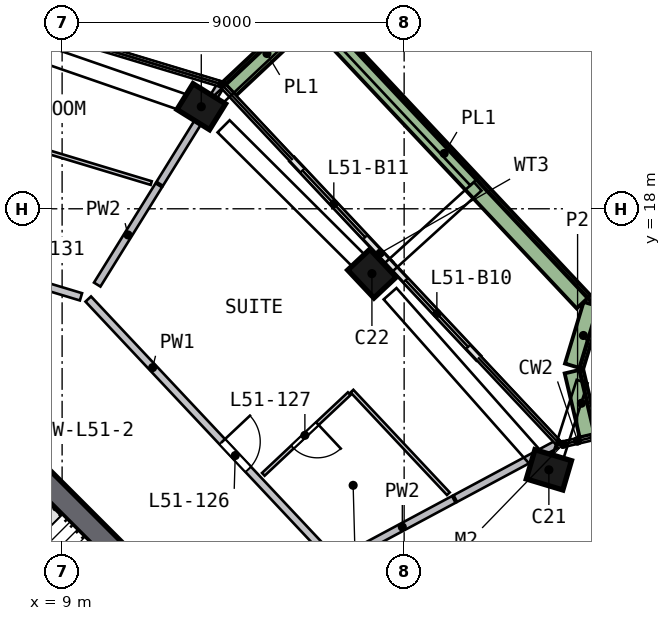
"""IFC4 building model, lengths in metres.
Left out: names, types, materials, properties, quantities, classifications, styles, units other than length and angle.
Written with IfcOpenShell. Run it as: python <this file> out.ifc"""

import sys

from ifc_helpers import new_model, si_unit, direction, frame, frame_2d, origin, origin_2d, place, context, subcontext, project, spatial, rectangle, extrude, element, fill, save


model = new_model("IFC4")
c1 = context("Model", 3, precision=1e-05, world=origin(), true_north=direction((0.0, 1.0)))
c2 = subcontext(c1, "Body", "Model", "MODEL_VIEW")
j1 = project(units=[si_unit("LENGTHUNIT", "METRE"), si_unit("PLANEANGLEUNIT", "RADIAN")], contexts=[c1])
p1 = place(None, origin())
s1 = spatial("IfcSite", under=j1, at=p1, CompositionType="ELEMENT")
p2 = place(p1, origin())
s2 = spatial("IfcBuilding", under=s1, at=p2, CompositionType="ELEMENT")
p3 = place(p2, frame((0.0, 0.0, 209.0)))
s3 = spatial("IfcBuildingStorey", under=s2, at=p3, CompositionType="ELEMENT", Elevation=209.0)
p4 = place(p3, frame((21.873, 11.005, 0.0), z_axis=(-0.053209958, 0.103531375, 0.99320187), x_axis=(0.956204867, -0.281393471, 0.080560333)))
e1 = element("IfcColumn", 1, at=p4, inside=s3, PredefinedType="COLUMN", context=c2, shape_type="SweptSolid", body=[
    extrude(rectangle(XDim=1.0, YDim=0.8, at=origin_2d()), origin(), (0.0, 0.0, 1.0), 3.212),
])
p5 = place(p3, frame((17.246, 16.195, 0.0), z_axis=(-0.077721499, 0.081371824, 0.993648829), x_axis=(-0.68019237, 0.724346074, -0.112521575)))
e2 = element("IfcColumn", 2, at=p5, inside=s3, PredefinedType="COLUMN", context=c2, shape_type="SweptSolid", body=[
    extrude(rectangle(XDim=1.0, YDim=0.8, at=origin_2d()), origin(), (0.0, 0.0, 1.0), 3.21),
])
p6 = place(p3, frame((12.781, 20.614, 0.0), z_axis=(-0.0985271, 0.059906909, 0.993329539), x_axis=(0.844341944, -0.523250609, 0.115306034)))
e3 = element("IfcColumn", 3, at=p6, inside=s3, PredefinedType="COLUMN", context=c2, shape_type="SweptSolid", body=[
    extrude(rectangle(XDim=1.0, YDim=0.8, at=origin_2d()), origin(), (0.0, 0.0, 1.0), 3.211),
])
p7 = place(p3, frame((13.788, 5.587, 0.0), z_axis=(0.0, 0.0, 1.0), x_axis=(-0.707106781, 0.707106781, 0.0)))
e4 = element("IfcWall", 4, at=p7, inside=s3, PredefinedType="SHEAR", context=c2, shape_type="SweptSolid", body=[
    extrude(rectangle(XDim=11.598, YDim=0.6, at=frame_2d((5.799, 0.0))), origin(), (0.0, 0.0, 1.0), 3.5),
])
p8 = place(p7, frame((2.099, 0.0, 0.0)))
e5 = element("IfcOpeningElement", 5, at=p8, cuts=e4, PredefinedType="OPENING", context=c2, shape_type="SweptSolid", body=[
    extrude(rectangle(XDim=1.2, YDim=2.1, at=frame_2d((0.6, 1.05))), frame((0.0, 0.31, 0.0), z_axis=(0.0, -1.0, 0.0), x_axis=(1.0, 0.0, 0.0)), (0.0, 0.0, 1.0), 0.62),
])
p9 = place(p3, frame((19.956, 14.076, 0.0), z_axis=(0.0, 0.0, 1.0), x_axis=(-0.684533271, 0.728981619, 0.0)))
e6 = element("IfcWall", 6, at=p9, inside=s3, PredefinedType="SOLIDWALL", context=c2, shape_type="SweptSolid", body=[
    extrude(rectangle(XDim=3.4, YDim=0.15, at=frame_2d((1.7, 0.0))), origin(), (0.0, 0.0, 1.0), 2.475),
])
p10 = place(p9, frame((0.4, 0.0, 0.0)))
e7 = element("IfcOpeningElement", 7, at=p10, cuts=e6, PredefinedType="OPENING", context=c2, shape_type="SweptSolid", body=[
    extrude(rectangle(XDim=2.4, YDim=2.4, at=frame_2d((1.2, 1.2))), frame((0.0, 0.085, 0.0), z_axis=(0.0, -1.0, 0.0), x_axis=(1.0, 0.0, 0.0)), (0.0, 0.0, 1.0), 0.17),
])
p11 = place(p3, frame((17.629, 16.555, 0.0), z_axis=(0.0, 0.0, 1.0), x_axis=(-0.684558422, 0.728958001, 0.0)))
e8 = element("IfcWall", 8, at=p11, inside=s3, PredefinedType="SOLIDWALL", context=c2, shape_type="SweptSolid", body=[
    extrude(rectangle(XDim=3.761, YDim=0.15, at=frame_2d((1.881, 0.0))), origin(), (0.0, 0.0, 1.0), 2.475),
])
p12 = place(p11, frame((0.961, 0.0, 0.0)))
e9 = element("IfcOpeningElement", 9, at=p12, cuts=e8, PredefinedType="OPENING", context=c2, shape_type="SweptSolid", body=[
    extrude(rectangle(XDim=2.4, YDim=2.4, at=frame_2d((1.2, 1.2))), frame((0.0, 0.085, 0.0), z_axis=(0.0, -1.0, 0.0), x_axis=(1.0, 0.0, 0.0)), (0.0, 0.0, 1.0), 0.17),
])
p13 = place(p3, frame((22.863, 12.04, 0.0), z_axis=(0.0, 0.0, 1.0), x_axis=(-0.228308287, 0.97358889, 0.0)))
e10 = element("IfcWall", 10, at=p13, inside=s3, PredefinedType="SOLIDWALL", context=c2, shape_type="SweptSolid", body=[
    extrude(rectangle(XDim=1.731, YDim=0.5, at=frame_2d((0.866, 0.0))), origin(), (0.0, 0.0, 1.0), 0.7),
])
p14 = place(p3, frame((22.472, 13.854, 0.0), z_axis=(0.0, 0.0, 1.0), x_axis=(0.288919913, 0.95735327, 0.0)))
e11 = element("IfcWall", 11, at=p14, inside=s3, PredefinedType="SOLIDWALL", context=c2, shape_type="SweptSolid", body=[
    extrude(rectangle(XDim=1.695, YDim=0.5, at=frame_2d((0.848, 0.0))), origin(), (0.0, 0.0, 1.0), 0.7),
])
p15 = place(p3, frame((22.722, 15.55, 0.0), z_axis=(0.0, 0.0, 1.0), x_axis=(-0.684540163, 0.728975147, 0.0)))
e12 = element("IfcWall", 12, at=p15, inside=s3, PredefinedType="SOLIDWALL", context=c2, shape_type="SweptSolid", body=[
    extrude(rectangle(XDim=10.719, YDim=0.5, at=frame_2d((5.36, 0.0))), origin(), (0.0, 0.0, 1.0), 0.7),
])
p16 = place(p3, frame((15.373, 23.01, 0.0), z_axis=(0.0, 0.0, 1.0), x_axis=(-0.728964327, -0.684551685, 0.0)))
e13 = element("IfcWall", 13, at=p16, inside=s3, PredefinedType="SOLIDWALL", context=c2, shape_type="SweptSolid", body=[
    extrude(rectangle(XDim=2.699, YDim=0.5, at=frame_2d((1.35, 0.0))), origin(), (0.0, 0.0, 1.0), 0.7),
])
p17 = place(p3, frame((3.24, 9.629, 0.0), z_axis=(0.0, 0.0, 1.0), x_axis=(0.707106781, -0.707106781, 0.0)))
e14 = element("IfcWall", 14, at=p17, inside=s3, PredefinedType="SOLIDWALL", context=c2, shape_type="SweptSolid", body=[
    extrude(rectangle(XDim=9.036, YDim=0.2, at=frame_2d((4.518, 0.0))), origin(), (0.0, 0.0, 1.0), 3.19),
])
p18 = place(p17, frame((7.018, 0.0, 0.0)))
e15 = element("IfcOpeningElement", 15, at=p18, cuts=e14, PredefinedType="OPENING", context=c2, shape_type="SweptSolid", body=[
    extrude(rectangle(XDim=1.2, YDim=2.1, at=frame_2d((0.6, 1.05))), frame((0.0, 0.11, 0.0), z_axis=(0.0, -1.0, 0.0), x_axis=(1.0, 0.0, 0.0)), (0.0, 0.0, 1.0), 0.22),
])
p19 = place(p3, frame((0.577, 18.376, 0.0), z_axis=(0.0, 0.0, 1.0), x_axis=(0.957319229, -0.289032685, 0.0)))
e16 = element("IfcWall", 16, at=p19, inside=s3, PredefinedType="SOLIDWALL", context=c2, shape_type="SweptSolid", body=[
    extrude(rectangle(XDim=9.317, YDim=0.2, at=frame_2d((4.658, 0.0))), origin(), (0.0, 0.0, 1.0), 3.19),
])
p20 = place(p19, frame((1.9, 0.0, 0.0)))
e17 = element("IfcOpeningElement", 17, at=p20, cuts=e16, PredefinedType="OPENING", context=c2, shape_type="SweptSolid", body=[
    extrude(rectangle(XDim=1.0, YDim=2.1, at=frame_2d((0.5, 1.05))), frame((0.0, 0.11, 0.0), z_axis=(0.0, -1.0, 0.0), x_axis=(1.0, 0.0, 0.0)), (0.0, 0.0, 1.0), 0.22),
])
p21 = place(p3, frame((9.688, 15.625, 0.0), z_axis=(0.0, 0.0, 1.0), x_axis=(0.684549323, -0.728966545, 0.0)))
e18 = element("IfcWall", 18, at=p21, inside=s3, PredefinedType="SOLIDWALL", context=c2, shape_type="SweptSolid", body=[
    extrude(rectangle(XDim=9.317, YDim=0.2, at=frame_2d((4.658, 0.0))), origin(), (0.0, 0.0, 1.0), 3.19),
])
p22 = place(p21, frame((5.15, 0.0, 0.0)))
e19 = element("IfcOpeningElement", 19, at=p22, cuts=e18, PredefinedType="OPENING", context=c2, shape_type="SweptSolid", body=[
    extrude(rectangle(XDim=1.0, YDim=2.1, at=frame_2d((0.5, 1.05))), frame((0.0, 0.11, 0.0), z_axis=(0.0, -1.0, 0.0), x_axis=(1.0, 0.0, 0.0)), (0.0, 0.0, 1.0), 0.22),
])
p23 = place(p3, frame((9.924, 16.005, 0.0), z_axis=(0.0, 0.0, 1.0), x_axis=(0.526969492, 0.849884201, 0.0)))
e20 = element("IfcWall", 20, at=p23, inside=s3, PredefinedType="SOLIDWALL", context=c2, shape_type="SweptSolid", body=[
    extrude(rectangle(XDim=3.075, YDim=0.2, at=frame_2d((1.538, 0.0))), origin(), (0.0, 0.0, 1.0), 3.19),
])
p24 = place(p3, frame((11.568, 18.657, 0.0), z_axis=(0.0, 0.0, 1.0), x_axis=(0.526912729, 0.849919394, 0.0)))
e21 = element("IfcWall", 21, at=p24, inside=s3, PredefinedType="SOLIDWALL", context=c2, shape_type="SweptSolid", body=[
    extrude(rectangle(XDim=3.011, YDim=0.2, at=frame_2d((1.506, 0.0))), origin(), (0.0, 0.0, 1.0), 3.19),
])
p25 = place(p3, frame((16.597, 8.899, 0.0), z_axis=(0.0, 0.0, 1.0), x_axis=(0.88131111, 0.472536482, 0.0)))
e22 = element("IfcWall", 22, at=p25, inside=s3, PredefinedType="SOLIDWALL", context=c2, shape_type="SweptSolid", body=[
    extrude(rectangle(XDim=3.075, YDim=0.2, at=frame_2d((1.537, 0.0))), origin(), (0.0, 0.0, 1.0), 3.19),
])
p26 = place(p3, frame((19.347, 10.374, 0.0), z_axis=(0.0, 0.0, 1.0), x_axis=(0.881302745, 0.472552084, 0.0)))
e23 = element("IfcWall", 23, at=p26, inside=s3, PredefinedType="SOLIDWALL", context=c2, shape_type="SweptSolid", body=[
    extrude(rectangle(XDim=3.011, YDim=0.2, at=frame_2d((1.506, 0.0))), origin(), (0.0, 0.0, 1.0), 3.19),
])
p27 = place(p3, frame((11.344, 18.677, 0.0), z_axis=(0.0, 0.0, 1.0), x_axis=(-0.957320485, 0.289028527, 0.0)))
e24 = element("IfcWall", 24, at=p27, inside=s3, PredefinedType="PARTITIONING", context=c2, shape_type="SweptSolid", body=[
    extrude(rectangle(XDim=3.704, YDim=0.1, at=frame_2d((1.852, 0.0))), origin(), (0.0, 0.0, 1.0), 3.19),
])
p28 = place(p3, frame((16.554, 13.134, 0.0), z_axis=(0.0, 0.0, 1.0), x_axis=(-0.728967156, -0.684548673, 0.0)))
e25 = element("IfcWall", 25, at=p28, inside=s3, PredefinedType="PARTITIONING", context=c2, shape_type="SweptSolid", body=[
    extrude(rectangle(XDim=3.1, YDim=0.1, at=frame_2d((1.55, 0.0))), origin(), (0.0, 0.0, 1.0), 3.19),
])
p29 = place(p28, frame((1.15, 0.0, 0.0)))
e26 = element("IfcOpeningElement", 26, at=p29, cuts=e25, PredefinedType="OPENING", context=c2, shape_type="SweptSolid", body=[
    extrude(rectangle(XDim=0.9, YDim=2.1, at=frame_2d((0.45, 1.05))), frame((0.0, 0.06, 0.0), z_axis=(0.0, -1.0, 0.0), x_axis=(1.0, 0.0, 0.0)), (0.0, 0.0, 1.0), 0.12),
])
p30 = place(p3, frame((16.627, 13.202, 0.0), z_axis=(0.0, 0.0, 1.0), x_axis=(0.684546009, -0.728969657, 0.0)))
e27 = element("IfcWall", 27, at=p30, inside=s3, PredefinedType="PARTITIONING", context=c2, shape_type="SweptSolid", body=[
    extrude(rectangle(XDim=3.704, YDim=0.1, at=frame_2d((1.852, 0.0))), origin(), (0.0, 0.0, 1.0), 3.19),
])
p31 = place(p10, origin())
e28 = element("IfcDoor", 28, at=p31, inside=s3, OperationType="SLIDING_TO_RIGHT", PredefinedType="DOOR", context=c2, shape_type="SweptSolid", body=[
    extrude(rectangle(XDim=2.4, YDim=2.4, at=frame_2d((1.2, 1.2))), frame((0.0, 0.025, 0.0), z_axis=(0.0, -1.0, 0.0), x_axis=(1.0, 0.0, 0.0)), (0.0, 0.0, 1.0), 0.05),
])
fill(e7, e28)
p32 = place(p12, origin())
e29 = element("IfcDoor", 29, at=p32, inside=s3, OperationType="SLIDING_TO_LEFT", PredefinedType="DOOR", context=c2, shape_type="SweptSolid", body=[
    extrude(rectangle(XDim=2.4, YDim=2.4, at=frame_2d((1.2, 1.2))), frame((0.0, 0.025, 0.0), z_axis=(0.0, -1.0, 0.0), x_axis=(1.0, 0.0, 0.0)), (0.0, 0.0, 1.0), 0.05),
])
fill(e9, e29)
p33 = place(p22, origin())
e30 = element("IfcDoor", 30, at=p33, inside=s3, OperationType="SINGLE_SWING_LEFT", PredefinedType="DOOR", context=c2, shape_type="SweptSolid", body=[
    extrude(rectangle(XDim=1.0, YDim=2.1, at=frame_2d((0.5, 1.05))), frame((0.0, 0.025, 0.0), z_axis=(0.0, -1.0, 0.0), x_axis=(1.0, 0.0, 0.0)), (0.0, 0.0, 1.0), 0.05),
])
fill(e19, e30)
p34 = place(p29, origin())
e31 = element("IfcDoor", 31, at=p34, inside=s3, OperationType="SINGLE_SWING_LEFT", PredefinedType="DOOR", context=c2, shape_type="SweptSolid", body=[
    extrude(rectangle(XDim=0.9, YDim=2.1, at=frame_2d((0.45, 1.05))), frame((0.0, 0.025, 0.0), z_axis=(0.0, -1.0, 0.0), x_axis=(1.0, 0.0, 0.0)), (0.0, 0.0, 1.0), 0.05),
])
fill(e26, e31)
save(model, sys.argv[1])
